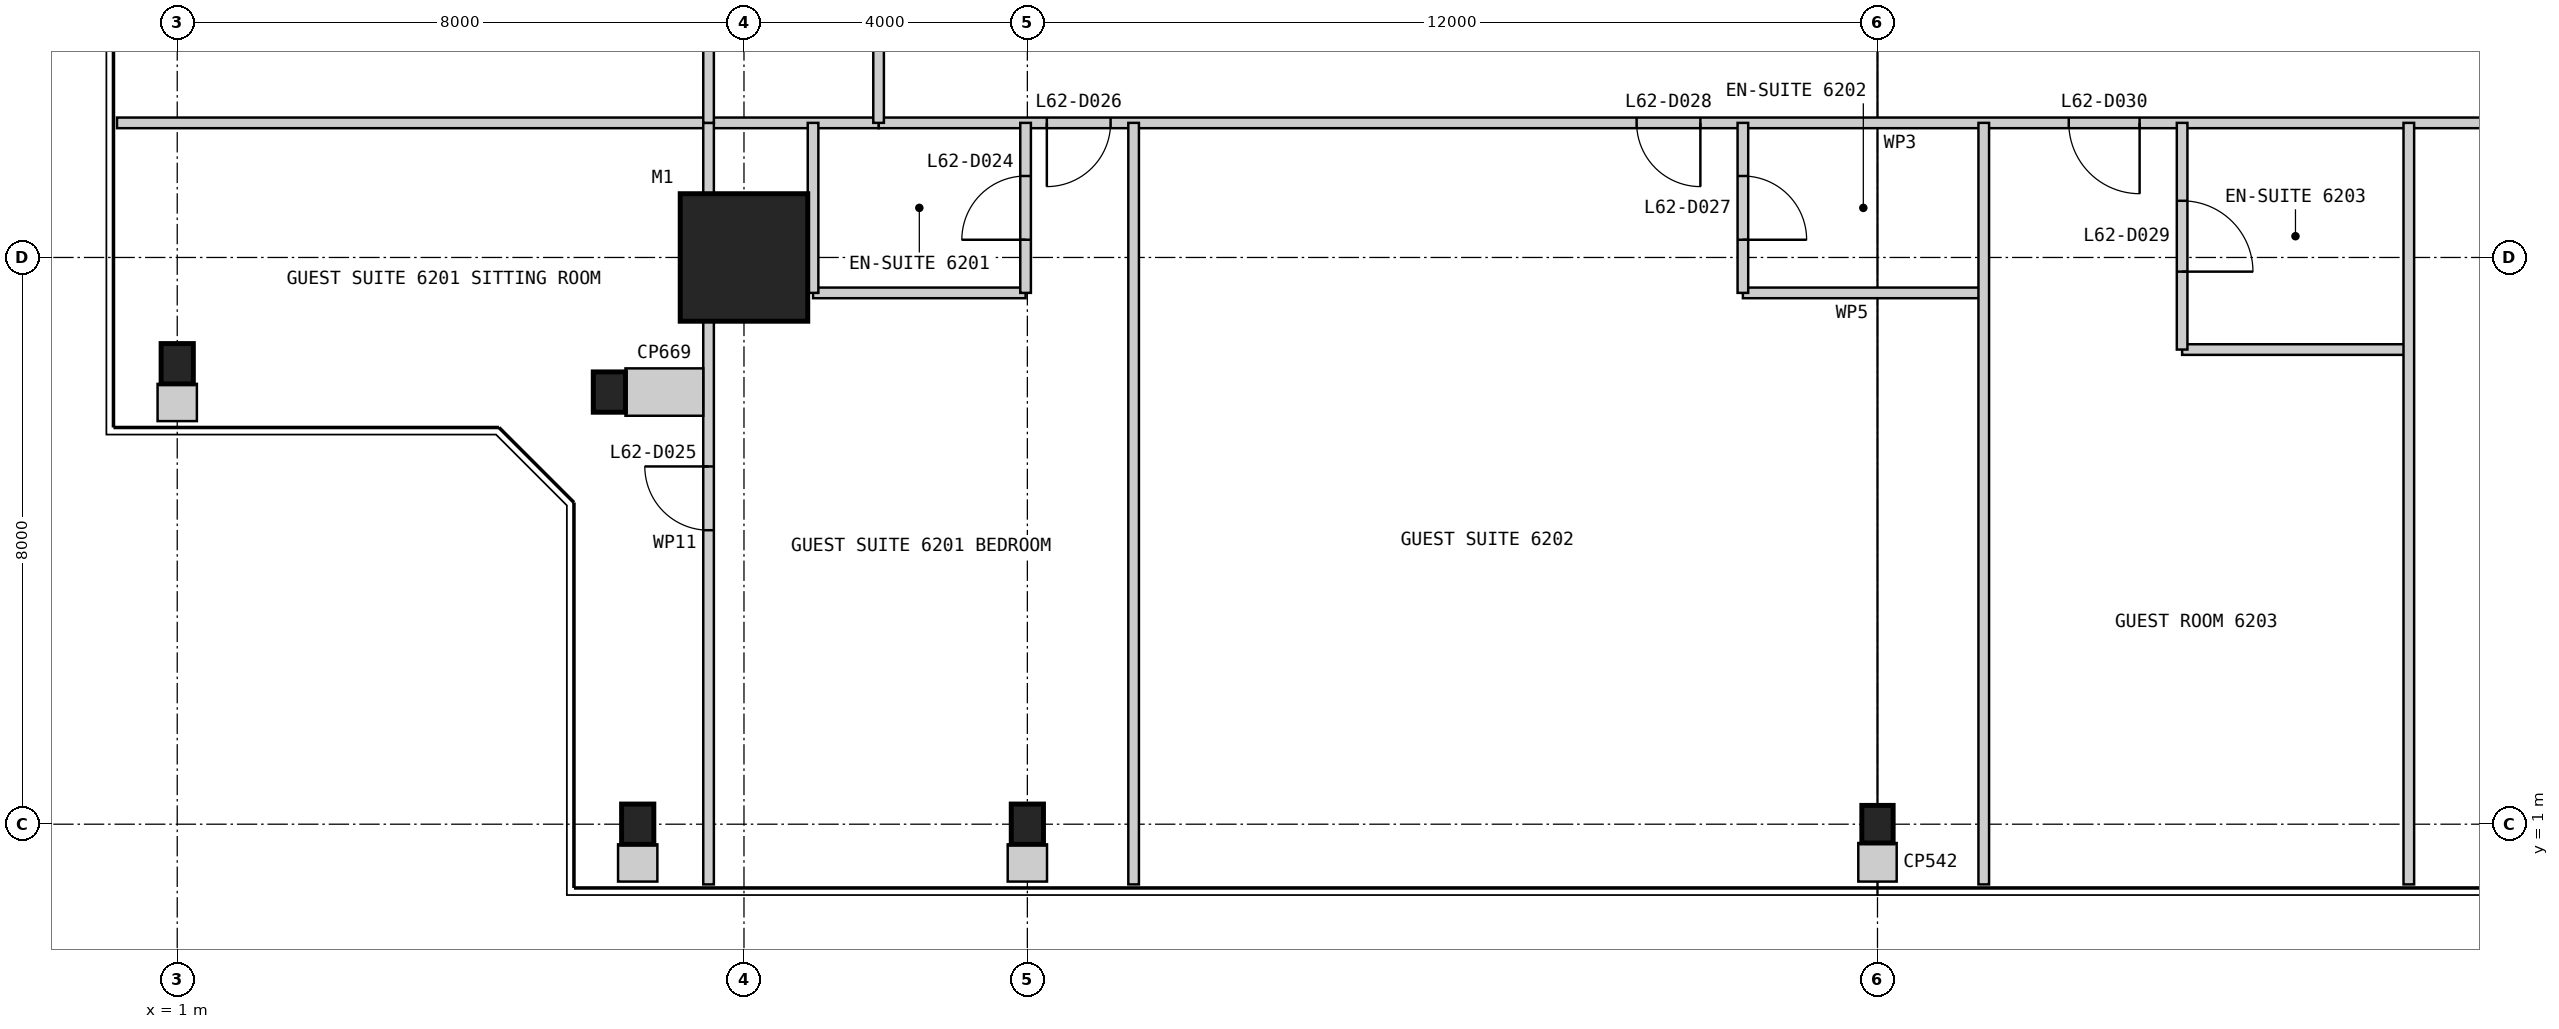
"""IFC4 building model, lengths in metres.
Left out: names, types, materials, properties, quantities, classifications, styles, units other than length and angle.
Written with IfcOpenShell. Run it as: python <this file> out.ifc"""

import sys

from ifc_helpers import new_model, si_unit, direction, frame, frame_2d, origin, origin_2d, place, context, subcontext, project, spatial, rectangle, i_section, extrude, element, fill, save


model = new_model("IFC4")
c1 = context("Model", 3, precision=1e-05, world=origin(), true_north=direction((0.0, 1.0)))
c2 = subcontext(c1, "Body", "Model", "MODEL_VIEW")
j1 = project(units=[si_unit("LENGTHUNIT", "METRE"), si_unit("PLANEANGLEUNIT", "RADIAN")], contexts=[c1])
p1 = place(None, origin())
s1 = spatial("IfcSite", under=j1, at=p1, CompositionType="ELEMENT")
p2 = place(p1, origin())
s2 = spatial("IfcBuilding", under=s1, at=p2, CompositionType="ELEMENT")
p3 = place(p2, frame((0.0, 0.0, 262.8)))
s3 = spatial("IfcBuildingStorey", under=s2, at=p3, CompositionType="ELEMENT", Elevation=262.8)
p4 = place(p3, frame((9.0, 9.0, 0.0), z_axis=(0.0, 0.0, 1.0), x_axis=(1.0, 0.0, 0.0)))
e1 = element("IfcColumn", 1, at=p4, inside=s3, PredefinedType="COLUMN", context=c2, shape_type="SweptSolid", body=[
    extrude(rectangle(XDim=1.8, YDim=1.8, at=origin_2d()), origin(), (0.0, 0.0, 1.0), 3.4),
])
for number, where, z_axis, x_axis in (
    (2, (7.5, 1.0, 0.0), (0.0, 0.0, 1.0), (1.0, 0.0, 0.0)),
    (3, (13.0, 1.0, 0.0), (0.0, 0.0, 1.0), (1.0, 0.0, 0.0)),
):
    element("IfcColumn", number, at=place(p3, frame(where, z_axis=z_axis, x_axis=x_axis)), inside=s3, PredefinedType="COLUMN", context=c2, shape_type="SweptSolid", body=[
        extrude(i_section(OverallWidth=0.455, OverallDepth=0.569, WebThickness=0.078, FlangeThickness=0.125, at=origin_2d()), origin(), (0.0, 0.0, 1.0), 3.4),
    ])
p5 = place(p3, frame((25.0, 1.0, 0.0), z_axis=(0.0, 0.0, 1.0), x_axis=(1.0, 0.0, 0.0)))
e4 = element("IfcColumn", 4, at=p5, inside=s3, PredefinedType="COLUMN", context=c2, shape_type="SweptSolid", body=[
    extrude(i_section(OverallWidth=0.442, OverallDepth=0.531, WebThickness=0.066, FlangeThickness=0.106, at=origin_2d()), origin(), (0.0, 0.0, 1.0), 3.4),
])
for number, where, z_axis, x_axis in (
    (5, (1.0, 7.5, 0.0), (0.0, 0.0, 1.0), (1.0, 0.0, 0.0)),
    (6, (7.1, 7.1, 0.0), (0.0, 0.0, 1.0), (1.0, 0.0, 0.0)),
):
    element("IfcColumn", number, at=place(p3, frame(where, z_axis=z_axis, x_axis=x_axis)), inside=s3, PredefinedType="COLUMN", context=c2, shape_type="SweptSolid", body=[
        extrude(i_section(OverallWidth=0.455, OverallDepth=0.569, WebThickness=0.078, FlangeThickness=0.125, at=origin_2d()), origin(), (0.0, 0.0, 1.0), 3.4),
    ])
p6 = place(p3, frame((10.9, 10.9, 0.0), z_axis=(0.0, 0.0, 1.0), x_axis=(1.0, 0.0, 0.0)))
e7 = element("IfcWall", 7, at=p6, inside=s3, PredefinedType="PARTITIONING", context=c2, shape_type="SweptSolid", body=[
    extrude(rectangle(XDim=28.2, YDim=0.15, at=frame_2d((14.1, 0.0))), origin(), (0.0, 0.0, 1.0), 3.25),
])
p7 = place(p6, frame((2.375, 0.0, 0.0)))
e8 = element("IfcOpeningElement", 8, at=p7, cuts=e7, PredefinedType="OPENING", context=c2, shape_type="SweptSolid", body=[
    extrude(rectangle(XDim=0.9, YDim=2.1, at=frame_2d((0.45, 1.05))), frame((0.0, 0.085, 0.0), z_axis=(0.0, -1.0, 0.0), x_axis=(1.0, 0.0, 0.0)), (0.0, 0.0, 1.0), 0.17),
])
p8 = place(p6, frame((10.7, 0.0, 0.0)))
e9 = element("IfcOpeningElement", 9, at=p8, cuts=e7, PredefinedType="OPENING", context=c2, shape_type="SweptSolid", body=[
    extrude(rectangle(XDim=0.9, YDim=2.1, at=frame_2d((0.45, 1.05))), frame((0.0, 0.085, 0.0), z_axis=(0.0, -1.0, 0.0), x_axis=(1.0, 0.0, 0.0)), (0.0, 0.0, 1.0), 0.17),
])
p9 = place(p6, frame((16.8, 0.0, 0.0)))
e10 = element("IfcOpeningElement", 10, at=p9, cuts=e7, PredefinedType="OPENING", context=c2, shape_type="SweptSolid", body=[
    extrude(rectangle(XDim=1.0, YDim=2.1, at=frame_2d((0.5, 1.05))), frame((0.0, 0.085, 0.0), z_axis=(0.0, -1.0, 0.0), x_axis=(1.0, 0.0, 0.0)), (0.0, 0.0, 1.0), 0.17),
])
p10 = place(p6, frame((23.7, 0.0, 0.0)))
e11 = element("IfcOpeningElement", 11, at=p10, cuts=e7, PredefinedType="OPENING", context=c2, shape_type="SweptSolid", body=[
    extrude(rectangle(XDim=0.9, YDim=2.1, at=frame_2d((0.45, 1.05))), frame((0.0, 0.085, 0.0), z_axis=(0.0, -1.0, 0.0), x_axis=(1.0, 0.0, 0.0)), (0.0, 0.0, 1.0), 0.17),
])
p11 = place(p3, frame((0.15, 10.9, 0.0), z_axis=(0.0, 0.0, 1.0), x_axis=(1.0, 0.0, 0.0)))
e12 = element("IfcWall", 12, at=p11, inside=s3, PredefinedType="PARTITIONING", context=c2, shape_type="SweptSolid", body=[
    extrude(rectangle(XDim=10.75, YDim=0.15, at=frame_2d((5.375, 0.0))), origin(), (0.0, 0.0, 1.0), 3.25),
])
p12 = place(p3, frame((9.975, 8.5, 0.0), z_axis=(0.0, 0.0, 1.0), x_axis=(1.0, 0.0, 0.0)))
e13 = element("IfcWall", 13, at=p12, inside=s3, PredefinedType="PARTITIONING", context=c2, shape_type="SweptSolid", body=[
    extrude(rectangle(XDim=3.0, YDim=0.15, at=frame_2d((1.5, 0.0))), origin(), (0.0, 0.0, 1.0), 3.25),
])
p13 = place(p3, frame((12.975, 8.5, 0.0), z_axis=(0.0, 0.0, 1.0), x_axis=(0.0, 1.0, 0.0)))
e14 = element("IfcWall", 14, at=p13, inside=s3, PredefinedType="PARTITIONING", context=c2, shape_type="SweptSolid", body=[
    extrude(rectangle(XDim=2.4, YDim=0.15, at=frame_2d((1.2, 0.0))), origin(), (0.0, 0.0, 1.0), 2.628),
])
p14 = place(p13, frame((0.75, 0.0, 0.0)))
e15 = element("IfcOpeningElement", 15, at=p14, cuts=e14, PredefinedType="OPENING", context=c2, shape_type="SweptSolid", body=[
    extrude(rectangle(XDim=0.9, YDim=2.1, at=frame_2d((0.45, 1.05))), frame((0.0, 0.085, 0.0), z_axis=(0.0, -1.0, 0.0), x_axis=(1.0, 0.0, 0.0)), (0.0, 0.0, 1.0), 0.17),
])
p15 = place(p3, frame((9.975, 8.5, 0.0), z_axis=(0.0, 0.0, 1.0), x_axis=(0.0, 1.0, 0.0)))
e16 = element("IfcWall", 16, at=p15, inside=s3, PredefinedType="PARTITIONING", context=c2, shape_type="SweptSolid", body=[
    extrude(rectangle(XDim=2.4, YDim=0.15, at=frame_2d((1.2, 0.0))), origin(), (0.0, 0.0, 1.0), 3.25),
])
p16 = place(p3, frame((8.5, 0.15, 0.0), z_axis=(0.0, 0.0, 1.0), x_axis=(0.0, 1.0, 0.0)))
e17 = element("IfcWall", 17, at=p16, inside=s3, PredefinedType="PARTITIONING", context=c2, shape_type="SweptSolid", body=[
    extrude(rectangle(XDim=10.75, YDim=0.15, at=frame_2d((5.375, 0.0))), origin(), (0.0, 0.0, 1.0), 3.25),
])
p17 = place(p16, frame((5.0, 0.0, 0.0)))
e18 = element("IfcOpeningElement", 18, at=p17, cuts=e17, PredefinedType="OPENING", context=c2, shape_type="SweptSolid", body=[
    extrude(rectangle(XDim=0.9, YDim=2.1, at=frame_2d((0.45, 1.05))), frame((0.0, 0.085, 0.0), z_axis=(0.0, -1.0, 0.0), x_axis=(1.0, 0.0, 0.0)), (0.0, 0.0, 1.0), 0.17),
])
p18 = place(p3, frame((14.5, 0.15, 0.0), z_axis=(0.0, 0.0, 1.0), x_axis=(0.0, 1.0, 0.0)))
e19 = element("IfcWall", 19, at=p18, inside=s3, PredefinedType="PARTITIONING", context=c2, shape_type="SweptSolid", body=[
    extrude(rectangle(XDim=10.75, YDim=0.15, at=frame_2d((5.375, 0.0))), origin(), (0.0, 0.0, 1.0), 3.25),
])
p19 = place(p3, frame((23.1, 8.5, 0.0), z_axis=(0.0, 0.0, 1.0), x_axis=(1.0, 0.0, 0.0)))
e20 = element("IfcWall", 20, at=p19, inside=s3, PredefinedType="PARTITIONING", context=c2, shape_type="SweptSolid", body=[
    extrude(rectangle(XDim=3.4, YDim=0.15, at=frame_2d((1.7, 0.0))), origin(), (0.0, 0.0, 1.0), 3.25),
])
p20 = place(p3, frame((23.1, 8.5, 0.0), z_axis=(0.0, 0.0, 1.0), x_axis=(0.0, 1.0, 0.0)))
e21 = element("IfcWall", 21, at=p20, inside=s3, PredefinedType="PARTITIONING", context=c2, shape_type="SweptSolid", body=[
    extrude(rectangle(XDim=2.4, YDim=0.15, at=frame_2d((1.2, 0.0))), origin(), (0.0, 0.0, 1.0), 3.25),
])
p21 = place(p20, frame((0.75, 0.0, 0.0)))
e22 = element("IfcOpeningElement", 22, at=p21, cuts=e21, PredefinedType="OPENING", context=c2, shape_type="SweptSolid", body=[
    extrude(rectangle(XDim=0.9, YDim=2.1, at=frame_2d((0.45, 1.05))), frame((0.0, 0.085, 0.0), z_axis=(0.0, -1.0, 0.0), x_axis=(1.0, 0.0, 0.0)), (0.0, 0.0, 1.0), 0.17),
])
p22 = place(p3, frame((26.5, 0.15, 0.0), z_axis=(0.0, 0.0, 1.0), x_axis=(0.0, 1.0, 0.0)))
e23 = element("IfcWall", 23, at=p22, inside=s3, PredefinedType="PARTITIONING", context=c2, shape_type="SweptSolid", body=[
    extrude(rectangle(XDim=10.75, YDim=0.15, at=frame_2d((5.375, 0.0))), origin(), (0.0, 0.0, 1.0), 3.25),
])
p23 = place(p3, frame((29.3, 7.7, 0.0), z_axis=(0.0, 0.0, 1.0), x_axis=(1.0, 0.0, 0.0)))
e24 = element("IfcWall", 24, at=p23, inside=s3, PredefinedType="PARTITIONING", context=c2, shape_type="SweptSolid", body=[
    extrude(rectangle(XDim=3.2, YDim=0.15, at=frame_2d((1.6, 0.0))), origin(), (0.0, 0.0, 1.0), 3.25),
])
p24 = place(p3, frame((29.3, 7.7, 0.0), z_axis=(0.0, 0.0, 1.0), x_axis=(0.0, 1.0, 0.0)))
e25 = element("IfcWall", 25, at=p24, inside=s3, PredefinedType="PARTITIONING", context=c2, shape_type="SweptSolid", body=[
    extrude(rectangle(XDim=3.2, YDim=0.15, at=frame_2d((1.6, 0.0))), origin(), (0.0, 0.0, 1.0), 3.25),
])
p25 = place(p24, frame((1.1, 0.0, 0.0)))
e26 = element("IfcOpeningElement", 26, at=p25, cuts=e25, PredefinedType="OPENING", context=c2, shape_type="SweptSolid", body=[
    extrude(rectangle(XDim=1.0, YDim=2.1, at=frame_2d((0.5, 1.05))), frame((0.0, 0.085, 0.0), z_axis=(0.0, -1.0, 0.0), x_axis=(1.0, 0.0, 0.0)), (0.0, 0.0, 1.0), 0.17),
])
p26 = place(p3, frame((32.5, 0.15, 0.0), z_axis=(0.0, 0.0, 1.0), x_axis=(0.0, 1.0, 0.0)))
e27 = element("IfcWall", 27, at=p26, inside=s3, PredefinedType="PARTITIONING", context=c2, shape_type="SweptSolid", body=[
    extrude(rectangle(XDim=10.75, YDim=0.15, at=frame_2d((5.375, 0.0))), origin(), (0.0, 0.0, 1.0), 3.25),
])
p27 = place(p3, frame((10.9, 39.1, 0.0), z_axis=(0.0, 0.0, 1.0), x_axis=(0.0, -1.0, 0.0)))
e28 = element("IfcWall", 28, at=p27, inside=s3, PredefinedType="PARTITIONING", context=c2, shape_type="SweptSolid", body=[
    extrude(rectangle(XDim=28.2, YDim=0.15, at=frame_2d((14.1, 0.0))), origin(), (0.0, 0.0, 1.0), 3.25),
])
p28 = place(p27, frame((2.375, 0.0, 0.0)))
e29 = element("IfcOpeningElement", 29, at=p28, cuts=e28, PredefinedType="OPENING", context=c2, shape_type="SweptSolid", body=[
    extrude(rectangle(XDim=0.9, YDim=2.1, at=frame_2d((0.45, 1.05))), frame((0.0, 0.085, 0.0), z_axis=(0.0, -1.0, 0.0), x_axis=(1.0, 0.0, 0.0)), (0.0, 0.0, 1.0), 0.17),
])
p29 = place(p27, frame((10.7, 0.0, 0.0)))
e30 = element("IfcOpeningElement", 30, at=p29, cuts=e28, PredefinedType="OPENING", context=c2, shape_type="SweptSolid", body=[
    extrude(rectangle(XDim=0.9, YDim=2.1, at=frame_2d((0.45, 1.05))), frame((0.0, 0.085, 0.0), z_axis=(0.0, -1.0, 0.0), x_axis=(1.0, 0.0, 0.0)), (0.0, 0.0, 1.0), 0.17),
])
p30 = place(p27, frame((17.1, 0.0, 0.0)))
e31 = element("IfcOpeningElement", 31, at=p30, cuts=e28, PredefinedType="OPENING", context=c2, shape_type="SweptSolid", body=[
    extrude(rectangle(XDim=0.9, YDim=2.1, at=frame_2d((0.45, 1.05))), frame((0.0, 0.085, 0.0), z_axis=(0.0, -1.0, 0.0), x_axis=(1.0, 0.0, 0.0)), (0.0, 0.0, 1.0), 0.17),
])
p31 = place(p27, frame((23.7, 0.0, 0.0)))
e32 = element("IfcOpeningElement", 32, at=p31, cuts=e28, PredefinedType="OPENING", context=c2, shape_type="SweptSolid", body=[
    extrude(rectangle(XDim=0.9, YDim=2.1, at=frame_2d((0.45, 1.05))), frame((0.0, 0.085, 0.0), z_axis=(0.0, -1.0, 0.0), x_axis=(1.0, 0.0, 0.0)), (0.0, 0.0, 1.0), 0.17),
])
p32 = place(p3, frame((8.5, 13.9, 0.0), z_axis=(0.0, 0.0, 1.0), x_axis=(0.0, -1.0, 0.0)))
e33 = element("IfcWall", 33, at=p32, inside=s3, PredefinedType="PARTITIONING", context=c2, shape_type="SweptSolid", body=[
    extrude(rectangle(XDim=3.0, YDim=0.15, at=frame_2d((1.5, 0.0))), origin(), (0.0, 0.0, 1.0), 3.25),
])
for number, where, z_axis, x_axis in (
    (34, (7.5, 0.19, 0.0), (0.0, 0.0, 1.0), (0.0, 1.0, 0.0)),
    (35, (1.0, 6.69, 0.0), (0.0, 0.0, 1.0), (0.0, 1.0, 0.0)),
):
    element("IfcWall", number, at=place(p3, frame(where, z_axis=z_axis, x_axis=x_axis)), inside=s3, PredefinedType="PARTITIONING", context=c2, shape_type="SweptSolid", body=[
        extrude(rectangle(XDim=0.526, YDim=0.555, at=frame_2d((0.263, 0.0))), origin(), (0.0, 0.0, 1.0), 3.25),
    ])
p33 = place(p3, frame((8.425, 7.1, 0.0), z_axis=(0.0, 0.0, 1.0), x_axis=(-1.0, 0.0, 0.0)))
e36 = element("IfcWall", 36, at=p33, inside=s3, PredefinedType="PARTITIONING", context=c2, shape_type="SweptSolid", body=[
    extrude(rectangle(XDim=1.098, YDim=0.669, at=frame_2d((0.549, 0.0))), origin(), (0.0, 0.0, 1.0), 3.25),
])
p34 = place(p3, frame((13.0, 0.19, 0.0), z_axis=(0.0, 0.0, 1.0), x_axis=(0.0, 1.0, 0.0)))
e37 = element("IfcWall", 37, at=p34, inside=s3, PredefinedType="PARTITIONING", context=c2, shape_type="SweptSolid", body=[
    extrude(rectangle(XDim=0.526, YDim=0.555, at=frame_2d((0.263, 0.0))), origin(), (0.0, 0.0, 1.0), 3.25),
])
p35 = place(p3, frame((25.0, 0.19, 0.0), z_axis=(0.0, 0.0, 1.0), x_axis=(0.0, 1.0, 0.0)))
e38 = element("IfcWall", 38, at=p35, inside=s3, PredefinedType="PARTITIONING", context=c2, shape_type="SweptSolid", body=[
    extrude(rectangle(XDim=0.545, YDim=0.542, at=frame_2d((0.272, 0.0))), origin(), (0.0, 0.0, 1.0), 3.25),
])
p36 = place(p14, origin())
e39 = element("IfcDoor", 39, at=p36, inside=s3, OperationType="SINGLE_SWING_LEFT", PredefinedType="DOOR", context=c2, shape_type="SweptSolid", body=[
    extrude(rectangle(XDim=0.9, YDim=2.1, at=frame_2d((0.45, 1.05))), frame((0.0, 0.025, 0.0), z_axis=(0.0, -1.0, 0.0), x_axis=(1.0, 0.0, 0.0)), (0.0, 0.0, 1.0), 0.05),
])
fill(e15, e39)
p37 = place(p17, origin())
e40 = element("IfcDoor", 40, at=p37, inside=s3, OperationType="SINGLE_SWING_RIGHT", PredefinedType="DOOR", context=c2, shape_type="SweptSolid", body=[
    extrude(rectangle(XDim=0.9, YDim=2.1, at=frame_2d((0.45, 1.05))), frame((0.0, 0.025, 0.0), z_axis=(0.0, -1.0, 0.0), x_axis=(1.0, 0.0, 0.0)), (0.0, 0.0, 1.0), 0.05),
])
fill(e18, e40)
p38 = place(p7, frame((0.9, 0.0, 0.0), z_axis=(0.0, 0.0, 1.0), x_axis=(-1.0, 0.0, 0.0)))
e41 = element("IfcDoor", 41, at=p38, inside=s3, OperationType="SINGLE_SWING_RIGHT", PredefinedType="DOOR", context=c2, shape_type="SweptSolid", body=[
    extrude(rectangle(XDim=0.9, YDim=2.1, at=frame_2d((0.45, 1.05))), frame((0.0, 0.025, 0.0), z_axis=(0.0, -1.0, 0.0), x_axis=(1.0, 0.0, 0.0)), (0.0, 0.0, 1.0), 0.05),
])
fill(e8, e41)
p39 = place(p21, frame((0.9, 0.0, 0.0), z_axis=(0.0, 0.0, 1.0), x_axis=(-1.0, 0.0, 0.0)))
e42 = element("IfcDoor", 42, at=p39, inside=s3, OperationType="SINGLE_SWING_RIGHT", PredefinedType="DOOR", context=c2, shape_type="SweptSolid", body=[
    extrude(rectangle(XDim=0.9, YDim=2.1, at=frame_2d((0.45, 1.05))), frame((0.0, 0.025, 0.0), z_axis=(0.0, -1.0, 0.0), x_axis=(1.0, 0.0, 0.0)), (0.0, 0.0, 1.0), 0.05),
])
fill(e22, e42)
p40 = place(p8, frame((0.9, 0.0, 0.0), z_axis=(0.0, 0.0, 1.0), x_axis=(-1.0, 0.0, 0.0)))
e43 = element("IfcDoor", 43, at=p40, inside=s3, OperationType="SINGLE_SWING_LEFT", PredefinedType="DOOR", context=c2, shape_type="SweptSolid", body=[
    extrude(rectangle(XDim=0.9, YDim=2.1, at=frame_2d((0.45, 1.05))), frame((0.0, 0.025, 0.0), z_axis=(0.0, -1.0, 0.0), x_axis=(1.0, 0.0, 0.0)), (0.0, 0.0, 1.0), 0.05),
])
fill(e9, e43)
p41 = place(p25, frame((1.0, 0.0, 0.0), z_axis=(0.0, 0.0, 1.0), x_axis=(-1.0, 0.0, 0.0)))
e44 = element("IfcDoor", 44, at=p41, inside=s3, OperationType="SINGLE_SWING_RIGHT", PredefinedType="DOOR", context=c2, shape_type="SweptSolid", body=[
    extrude(rectangle(XDim=1.0, YDim=2.1, at=frame_2d((0.5, 1.05))), frame((0.0, 0.025, 0.0), z_axis=(0.0, -1.0, 0.0), x_axis=(1.0, 0.0, 0.0)), (0.0, 0.0, 1.0), 0.05),
])
fill(e26, e44)
p42 = place(p9, frame((1.0, 0.0, 0.0), z_axis=(0.0, 0.0, 1.0), x_axis=(-1.0, 0.0, 0.0)))
e45 = element("IfcDoor", 45, at=p42, inside=s3, OperationType="SINGLE_SWING_LEFT", PredefinedType="DOOR", context=c2, shape_type="SweptSolid", body=[
    extrude(rectangle(XDim=1.0, YDim=2.1, at=frame_2d((0.5, 1.05))), frame((0.0, 0.025, 0.0), z_axis=(0.0, -1.0, 0.0), x_axis=(1.0, 0.0, 0.0)), (0.0, 0.0, 1.0), 0.05),
])
fill(e10, e45)
save(model, sys.argv[1])
